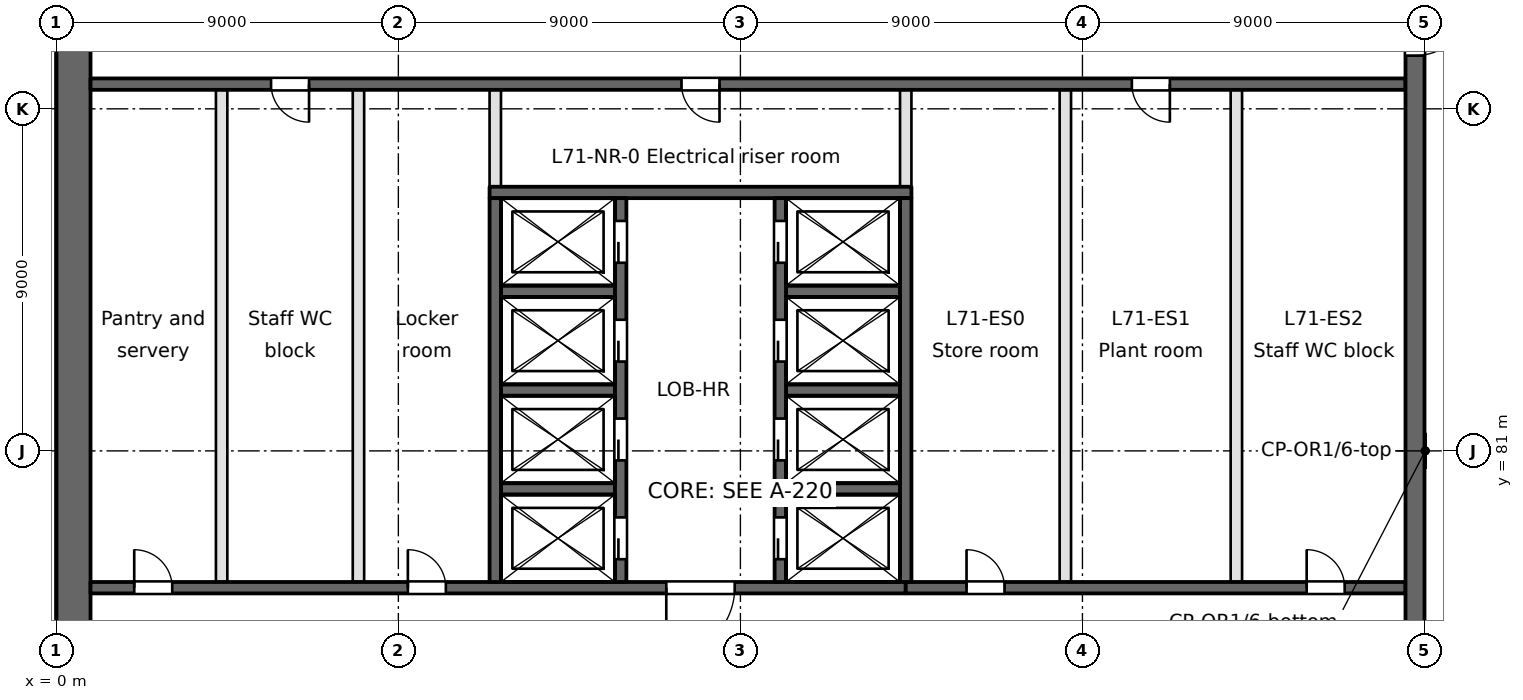
"""IFC4 building model, lengths in metres.
Left out: names, types, materials, properties, quantities, classifications, styles, units other than length and angle.
Written with IfcOpenShell. Run it as: python <this file> out.ifc"""

import sys

from ifc_helpers import new_model, si_unit, direction, frame, frame_2d, origin, place, context, subcontext, project, spatial, rectangle, extrude, element, fill, save


model = new_model("IFC4")
c1 = context("Model", 3, precision=1e-05, world=origin(), true_north=direction((0.0, 1.0)))
c2 = subcontext(c1, "Body", "Model", "MODEL_VIEW")
j1 = project(units=[si_unit("LENGTHUNIT", "METRE"), si_unit("PLANEANGLEUNIT", "RADIAN")], contexts=[c1])
p1 = place(None, origin())
s1 = spatial("IfcSite", under=j1, at=p1, CompositionType="ELEMENT")
p2 = place(p1, origin())
s2 = spatial("IfcBuilding", under=s1, at=p2, CompositionType="ELEMENT")
p3 = place(p2, frame((0.0, 0.0, 276.2)))
s3 = spatial("IfcBuildingStorey", under=s2, at=p3, CompositionType="ELEMENT", Elevation=276.2)
p4 = place(p3, frame((0.45, 94.5, 0.0), z_axis=(0.0, 0.0, 1.0), x_axis=(0.0, -1.0, 0.0)))
e1 = element("IfcWall", 1, at=p4, inside=s3, PredefinedType="SHEAR", context=c2, shape_type="SweptSolid", body=[
    extrude(rectangle(XDim=40.456, YDim=0.9, at=frame_2d((20.228, 0.0))), origin(), (0.0, 0.0, 1.0), 4.6),
])
p5 = place(p3, frame((0.9, 77.4, -0.45), z_axis=(0.0, 0.0, 1.0), x_axis=(1.0, 0.0, 0.0)))
e2 = element("IfcWall", 2, at=p5, inside=s3, PredefinedType="SOLIDWALL", context=c2, shape_type="SweptSolid", body=[
    extrude(rectangle(XDim=21.45, YDim=0.3, at=frame_2d((10.725, 0.0))), origin(), (0.0, 0.0, 1.0), 4.65),
])
p6 = place(p5, frame((15.15, 0.0, 0.45)))
e3 = element("IfcOpeningElement", 3, at=p6, cuts=e2, PredefinedType="OPENING", context=c2, shape_type="SweptSolid", body=[
    extrude(rectangle(XDim=1.8, YDim=2.1, at=frame_2d((0.9, 1.05))), frame((0.0, 0.15, 0.0), z_axis=(0.0, -1.0, 0.0), x_axis=(1.0, 0.0, 0.0)), (0.0, 0.0, 1.0), 0.3),
])
p7 = place(p5, frame((1.15, 0.0, 0.45)))
e4 = element("IfcOpeningElement", 4, at=p7, cuts=e2, PredefinedType="OPENING", context=c2, shape_type="SweptSolid", body=[
    extrude(rectangle(XDim=1.0, YDim=2.1, at=frame_2d((0.5, 1.05))), frame((0.0, 0.15, 0.0), z_axis=(0.0, -1.0, 0.0), x_axis=(1.0, 0.0, 0.0)), (0.0, 0.0, 1.0), 0.3),
])
p8 = place(p5, frame((8.35, 0.0, 0.45)))
e5 = element("IfcOpeningElement", 5, at=p8, cuts=e2, PredefinedType="OPENING", context=c2, shape_type="SweptSolid", body=[
    extrude(rectangle(XDim=1.0, YDim=2.1, at=frame_2d((0.5, 1.05))), frame((0.0, 0.15, 0.0), z_axis=(0.0, -1.0, 0.0), x_axis=(1.0, 0.0, 0.0)), (0.0, 0.0, 1.0), 0.3),
])
p9 = place(p3, frame((22.35, 77.4, 0.0), z_axis=(0.0, 0.0, 1.0), x_axis=(1.0, 0.0, 0.0)))
e6 = element("IfcWall", 6, at=p9, inside=s3, PredefinedType="SOLIDWALL", context=c2, shape_type="SweptSolid", body=[
    extrude(rectangle(XDim=13.15, YDim=0.3, at=frame_2d((6.575, 0.0))), origin(), (0.0, 0.0, 1.0), 4.2),
])
p10 = place(p9, frame((1.6, 0.0, 0.0)))
e7 = element("IfcOpeningElement", 7, at=p10, cuts=e6, PredefinedType="OPENING", context=c2, shape_type="SweptSolid", body=[
    extrude(rectangle(XDim=1.0, YDim=2.1, at=frame_2d((0.5, 1.05))), frame((0.0, 0.15, 0.0), z_axis=(0.0, -1.0, 0.0), x_axis=(1.0, 0.0, 0.0)), (0.0, 0.0, 1.0), 0.3),
])
p11 = place(p9, frame((10.55, 0.0, 0.0)))
e8 = element("IfcOpeningElement", 8, at=p11, cuts=e6, PredefinedType="OPENING", context=c2, shape_type="SweptSolid", body=[
    extrude(rectangle(XDim=1.0, YDim=2.1, at=frame_2d((0.5, 1.05))), frame((0.0, 0.15, 0.0), z_axis=(0.0, -1.0, 0.0), x_axis=(1.0, 0.0, 0.0)), (0.0, 0.0, 1.0), 0.3),
])
for number, where, z_axis, x_axis in (
    (9, (11.7, 80.0, -0.45), (0.0, 0.0, 1.0), (1.0, 0.0, 0.0)),
    (10, (19.2, 80.0, -0.45), (0.0, 0.0, 1.0), (1.0, 0.0, 0.0)),
    (11, (11.7, 82.6, -0.45), (0.0, 0.0, 1.0), (1.0, 0.0, 0.0)),
    (12, (19.2, 82.6, -0.45), (0.0, 0.0, 1.0), (1.0, 0.0, 0.0)),
    (13, (11.7, 85.2, -0.45), (0.0, 0.0, 1.0), (1.0, 0.0, 0.0)),
    (14, (19.2, 85.2, -0.45), (0.0, 0.0, 1.0), (1.0, 0.0, 0.0)),
):
    element("IfcWall", number, at=place(p3, frame(where, z_axis=z_axis, x_axis=x_axis)), inside=s3, PredefinedType="SOLIDWALL", context=c2, shape_type="SweptSolid", body=[
        extrude(rectangle(XDim=3.0, YDim=0.3, at=frame_2d((1.5, 0.0))), origin(), (0.0, 0.0, 1.0), 4.65),
    ])
p12 = place(p3, frame((11.4, 87.8, -0.45), z_axis=(0.0, 0.0, 1.0), x_axis=(1.0, 0.0, 0.0)))
e15 = element("IfcWall", 15, at=p12, inside=s3, PredefinedType="SOLIDWALL", context=c2, shape_type="SweptSolid", body=[
    extrude(rectangle(XDim=11.1, YDim=0.3, at=frame_2d((5.55, 0.0))), origin(), (0.0, 0.0, 1.0), 4.65),
])
p13 = place(p3, frame((0.9, 90.65, -0.45), z_axis=(0.0, 0.0, 1.0), x_axis=(1.0, 0.0, 0.0)))
e16 = element("IfcWall", 16, at=p13, inside=s3, PredefinedType="SOLIDWALL", context=c2, shape_type="SweptSolid", body=[
    extrude(rectangle(XDim=34.6, YDim=0.3, at=frame_2d((17.3, 0.0))), origin(), (0.0, 0.0, 1.0), 4.65),
])
p14 = place(p13, frame((15.55, 0.0, 0.45)))
e17 = element("IfcOpeningElement", 17, at=p14, cuts=e16, PredefinedType="OPENING", context=c2, shape_type="SweptSolid", body=[
    extrude(rectangle(XDim=1.0, YDim=2.1, at=frame_2d((0.5, 1.05))), frame((0.0, 0.15, 0.0), z_axis=(0.0, -1.0, 0.0), x_axis=(1.0, 0.0, 0.0)), (0.0, 0.0, 1.0), 0.3),
])
p15 = place(p13, frame((4.75, 0.0, 0.45)))
e18 = element("IfcOpeningElement", 18, at=p15, cuts=e16, PredefinedType="OPENING", context=c2, shape_type="SweptSolid", body=[
    extrude(rectangle(XDim=1.0, YDim=2.1, at=frame_2d((0.5, 1.05))), frame((0.0, 0.15, 0.0), z_axis=(0.0, -1.0, 0.0), x_axis=(1.0, 0.0, 0.0)), (0.0, 0.0, 1.0), 0.3),
])
p16 = place(p13, frame((27.4, 0.0, 0.45)))
e19 = element("IfcOpeningElement", 19, at=p16, cuts=e16, PredefinedType="OPENING", context=c2, shape_type="SweptSolid", body=[
    extrude(rectangle(XDim=1.0, YDim=2.1, at=frame_2d((0.5, 1.05))), frame((0.0, 0.15, 0.0), z_axis=(0.0, -1.0, 0.0), x_axis=(1.0, 0.0, 0.0)), (0.0, 0.0, 1.0), 0.3),
])
for number, where, z_axis, x_axis in (
    (20, (4.35, 77.55, 0.0), (0.0, 0.0, 1.0), (0.0, 1.0, 0.0)),
    (21, (7.95, 77.55, 0.0), (0.0, 0.0, 1.0), (0.0, 1.0, 0.0)),
):
    element("IfcWall", number, at=place(p3, frame(where, z_axis=z_axis, x_axis=x_axis)), inside=s3, PredefinedType="PARTITIONING", context=c2, shape_type="SweptSolid", body=[
        extrude(rectangle(XDim=12.95, YDim=0.3, at=frame_2d((6.475, 0.0))), origin(), (0.0, 0.0, 1.0), 4.2),
    ])
p17 = place(p3, frame((11.55, 77.55, -0.45), z_axis=(0.0, 0.0, 1.0), x_axis=(0.0, 1.0, 0.0)))
e22 = element("IfcWall", 22, at=p17, inside=s3, PredefinedType="SOLIDWALL", context=c2, shape_type="SweptSolid", body=[
    extrude(rectangle(XDim=10.1, YDim=0.3, at=frame_2d((5.05, 0.0))), origin(), (0.0, 0.0, 1.0), 4.65),
])
p18 = place(p3, frame((11.55, 87.95, 0.0), z_axis=(0.0, 0.0, 1.0), x_axis=(0.0, 1.0, 0.0)))
e23 = element("IfcWall", 23, at=p18, inside=s3, PredefinedType="PARTITIONING", context=c2, shape_type="SweptSolid", body=[
    extrude(rectangle(XDim=2.55, YDim=0.3, at=frame_2d((1.275, 0.0))), origin(), (0.0, 0.0, 1.0), 4.2),
])
p19 = place(p3, frame((14.85, 77.55, -0.45), z_axis=(0.0, 0.0, 1.0), x_axis=(0.0, 1.0, 0.0)))
e24 = element("IfcWall", 24, at=p19, inside=s3, PredefinedType="SOLIDWALL", context=c2, shape_type="SweptSolid", body=[
    extrude(rectangle(XDim=10.1, YDim=0.3, at=frame_2d((5.05, 0.0))), origin(), (0.0, 0.0, 1.0), 4.65),
])
p20 = place(p19, frame((0.6, 0.0, 0.45)))
e25 = element("IfcOpeningElement", 25, at=p20, cuts=e24, PredefinedType="OPENING", context=c2, shape_type="SweptSolid", body=[
    extrude(rectangle(XDim=1.1, YDim=2.1, at=frame_2d((0.55, 1.05))), frame((0.0, 0.15, 0.0), z_axis=(0.0, -1.0, 0.0), x_axis=(1.0, 0.0, 0.0)), (0.0, 0.0, 1.0), 0.3),
])
p21 = place(p19, frame((3.2, 0.0, 0.45)))
e26 = element("IfcOpeningElement", 26, at=p21, cuts=e24, PredefinedType="OPENING", context=c2, shape_type="SweptSolid", body=[
    extrude(rectangle(XDim=1.1, YDim=2.1, at=frame_2d((0.55, 1.05))), frame((0.0, 0.15, 0.0), z_axis=(0.0, -1.0, 0.0), x_axis=(1.0, 0.0, 0.0)), (0.0, 0.0, 1.0), 0.3),
])
p22 = place(p19, frame((5.8, 0.0, 0.45)))
e27 = element("IfcOpeningElement", 27, at=p22, cuts=e24, PredefinedType="OPENING", context=c2, shape_type="SweptSolid", body=[
    extrude(rectangle(XDim=1.1, YDim=2.1, at=frame_2d((0.55, 1.05))), frame((0.0, 0.15, 0.0), z_axis=(0.0, -1.0, 0.0), x_axis=(1.0, 0.0, 0.0)), (0.0, 0.0, 1.0), 0.3),
])
p23 = place(p19, frame((8.4, 0.0, 0.45)))
e28 = element("IfcOpeningElement", 28, at=p23, cuts=e24, PredefinedType="OPENING", context=c2, shape_type="SweptSolid", body=[
    extrude(rectangle(XDim=1.1, YDim=2.1, at=frame_2d((0.55, 1.05))), frame((0.0, 0.15, 0.0), z_axis=(0.0, -1.0, 0.0), x_axis=(1.0, 0.0, 0.0)), (0.0, 0.0, 1.0), 0.3),
])
p24 = place(p3, frame((19.05, 77.55, -0.45), z_axis=(0.0, 0.0, 1.0), x_axis=(0.0, 1.0, 0.0)))
e29 = element("IfcWall", 29, at=p24, inside=s3, PredefinedType="SOLIDWALL", context=c2, shape_type="SweptSolid", body=[
    extrude(rectangle(XDim=10.1, YDim=0.3, at=frame_2d((5.05, 0.0))), origin(), (0.0, 0.0, 1.0), 4.65),
])
p25 = place(p24, frame((0.6, 0.0, 0.45)))
e30 = element("IfcOpeningElement", 30, at=p25, cuts=e29, PredefinedType="OPENING", context=c2, shape_type="SweptSolid", body=[
    extrude(rectangle(XDim=1.1, YDim=2.1, at=frame_2d((0.55, 1.05))), frame((0.0, 0.15, 0.0), z_axis=(0.0, -1.0, 0.0), x_axis=(1.0, 0.0, 0.0)), (0.0, 0.0, 1.0), 0.3),
])
p26 = place(p24, frame((3.2, 0.0, 0.45)))
e31 = element("IfcOpeningElement", 31, at=p26, cuts=e29, PredefinedType="OPENING", context=c2, shape_type="SweptSolid", body=[
    extrude(rectangle(XDim=1.1, YDim=2.1, at=frame_2d((0.55, 1.05))), frame((0.0, 0.15, 0.0), z_axis=(0.0, -1.0, 0.0), x_axis=(1.0, 0.0, 0.0)), (0.0, 0.0, 1.0), 0.3),
])
p27 = place(p24, frame((5.8, 0.0, 0.45)))
e32 = element("IfcOpeningElement", 32, at=p27, cuts=e29, PredefinedType="OPENING", context=c2, shape_type="SweptSolid", body=[
    extrude(rectangle(XDim=1.1, YDim=2.1, at=frame_2d((0.55, 1.05))), frame((0.0, 0.15, 0.0), z_axis=(0.0, -1.0, 0.0), x_axis=(1.0, 0.0, 0.0)), (0.0, 0.0, 1.0), 0.3),
])
p28 = place(p24, frame((8.4, 0.0, 0.45)))
e33 = element("IfcOpeningElement", 33, at=p28, cuts=e29, PredefinedType="OPENING", context=c2, shape_type="SweptSolid", body=[
    extrude(rectangle(XDim=1.1, YDim=2.1, at=frame_2d((0.55, 1.05))), frame((0.0, 0.15, 0.0), z_axis=(0.0, -1.0, 0.0), x_axis=(1.0, 0.0, 0.0)), (0.0, 0.0, 1.0), 0.3),
])
p29 = place(p3, frame((22.35, 77.55, -0.45), z_axis=(0.0, 0.0, 1.0), x_axis=(0.0, 1.0, 0.0)))
e34 = element("IfcWall", 34, at=p29, inside=s3, PredefinedType="SOLIDWALL", context=c2, shape_type="SweptSolid", body=[
    extrude(rectangle(XDim=10.1, YDim=0.3, at=frame_2d((5.05, 0.0))), origin(), (0.0, 0.0, 1.0), 4.65),
])
p30 = place(p3, frame((22.35, 87.95, 0.0), z_axis=(0.0, 0.0, 1.0), x_axis=(0.0, 1.0, 0.0)))
e35 = element("IfcWall", 35, at=p30, inside=s3, PredefinedType="PARTITIONING", context=c2, shape_type="SweptSolid", body=[
    extrude(rectangle(XDim=2.55, YDim=0.3, at=frame_2d((1.275, 0.0))), origin(), (0.0, 0.0, 1.0), 4.2),
])
for number, where, z_axis, x_axis in (
    (36, (26.55, 77.55, 0.0), (0.0, 0.0, 1.0), (0.0, 1.0, 0.0)),
    (37, (31.05, 77.55, 0.0), (0.0, 0.0, 1.0), (0.0, 1.0, 0.0)),
):
    element("IfcWall", number, at=place(p3, frame(where, z_axis=z_axis, x_axis=x_axis)), inside=s3, PredefinedType="PARTITIONING", context=c2, shape_type="SweptSolid", body=[
        extrude(rectangle(XDim=12.95, YDim=0.3, at=frame_2d((6.475, 0.0))), origin(), (0.0, 0.0, 1.0), 4.2),
    ])
p31 = place(p3, frame((35.75, 63.5, -0.45), z_axis=(0.0, 0.0, 1.0), x_axis=(0.0, 1.0, 0.0)))
e38 = element("IfcWall", 38, at=p31, inside=s3, PredefinedType="SOLIDWALL", context=c2, shape_type="SweptSolid", body=[
    extrude(rectangle(XDim=34.6, YDim=0.5, at=frame_2d((17.3, 0.0))), origin(), (0.0, 0.0, 1.0), 4.65),
])
p32 = place(p31, frame((9.7, 0.0, 0.45)))
e39 = element("IfcOpeningElement", 39, at=p32, cuts=e38, PredefinedType="OPENING", context=c2, shape_type="SweptSolid", body=[
    extrude(rectangle(XDim=2.4, YDim=2.1, at=frame_2d((1.2, 1.05))), frame((0.0, 0.25, 0.0), z_axis=(0.0, -1.0, 0.0), x_axis=(1.0, 0.0, 0.0)), (0.0, 0.0, 1.0), 0.5),
])
p33 = place(p31, frame((27.9, 0.0, 0.45)))
e40 = element("IfcOpeningElement", 40, at=p33, cuts=e38, PredefinedType="OPENING", context=c2, shape_type="SweptSolid", body=[
    extrude(rectangle(XDim=1.5, YDim=2.1, at=frame_2d((0.75, 1.05))), frame((0.0, 0.25, 0.0), z_axis=(0.0, -1.0, 0.0), x_axis=(1.0, 0.0, 0.0)), (0.0, 0.0, 1.0), 0.5),
])
p34 = place(p31, frame((1.5, 0.0, 0.45)))
e41 = element("IfcOpeningElement", 41, at=p34, cuts=e38, PredefinedType="OPENING", context=c2, shape_type="SweptSolid", body=[
    extrude(rectangle(XDim=1.2, YDim=2.1, at=frame_2d((0.6, 1.05))), frame((0.0, 0.25, 0.0), z_axis=(0.0, -1.0, 0.0), x_axis=(1.0, 0.0, 0.0)), (0.0, 0.0, 1.0), 0.5),
])
p35 = place(p20, origin())
e42 = element("IfcDoor", 42, at=p35, inside=s3, OperationType="SLIDING_TO_RIGHT", PredefinedType="DOOR", context=c2, shape_type="SweptSolid", body=[
    extrude(rectangle(XDim=1.1, YDim=2.1, at=frame_2d((0.55, 1.05))), frame((0.0, 0.025, 0.0), z_axis=(0.0, -1.0, 0.0), x_axis=(1.0, 0.0, 0.0)), (0.0, 0.0, 1.0), 0.05),
])
fill(e25, e42)
p36 = place(p21, origin())
e43 = element("IfcDoor", 43, at=p36, inside=s3, OperationType="SLIDING_TO_LEFT", PredefinedType="DOOR", context=c2, shape_type="SweptSolid", body=[
    extrude(rectangle(XDim=1.1, YDim=2.1, at=frame_2d((0.55, 1.05))), frame((0.0, 0.025, 0.0), z_axis=(0.0, -1.0, 0.0), x_axis=(1.0, 0.0, 0.0)), (0.0, 0.0, 1.0), 0.05),
])
fill(e26, e43)
p37 = place(p22, origin())
e44 = element("IfcDoor", 44, at=p37, inside=s3, OperationType="SLIDING_TO_RIGHT", PredefinedType="DOOR", context=c2, shape_type="SweptSolid", body=[
    extrude(rectangle(XDim=1.1, YDim=2.1, at=frame_2d((0.55, 1.05))), frame((0.0, 0.025, 0.0), z_axis=(0.0, -1.0, 0.0), x_axis=(1.0, 0.0, 0.0)), (0.0, 0.0, 1.0), 0.05),
])
fill(e27, e44)
p38 = place(p23, origin())
e45 = element("IfcDoor", 45, at=p38, inside=s3, OperationType="SLIDING_TO_LEFT", PredefinedType="DOOR", context=c2, shape_type="SweptSolid", body=[
    extrude(rectangle(XDim=1.1, YDim=2.1, at=frame_2d((0.55, 1.05))), frame((0.0, 0.025, 0.0), z_axis=(0.0, -1.0, 0.0), x_axis=(1.0, 0.0, 0.0)), (0.0, 0.0, 1.0), 0.05),
])
fill(e28, e45)
p39 = place(p25, origin())
e46 = element("IfcDoor", 46, at=p39, inside=s3, OperationType="SLIDING_TO_RIGHT", PredefinedType="DOOR", context=c2, shape_type="SweptSolid", body=[
    extrude(rectangle(XDim=1.1, YDim=2.1, at=frame_2d((0.55, 1.05))), frame((0.0, 0.025, 0.0), z_axis=(0.0, -1.0, 0.0), x_axis=(1.0, 0.0, 0.0)), (0.0, 0.0, 1.0), 0.05),
])
fill(e30, e46)
p40 = place(p26, origin())
e47 = element("IfcDoor", 47, at=p40, inside=s3, OperationType="SLIDING_TO_LEFT", PredefinedType="DOOR", context=c2, shape_type="SweptSolid", body=[
    extrude(rectangle(XDim=1.1, YDim=2.1, at=frame_2d((0.55, 1.05))), frame((0.0, 0.025, 0.0), z_axis=(0.0, -1.0, 0.0), x_axis=(1.0, 0.0, 0.0)), (0.0, 0.0, 1.0), 0.05),
])
fill(e31, e47)
p41 = place(p27, origin())
e48 = element("IfcDoor", 48, at=p41, inside=s3, OperationType="SLIDING_TO_RIGHT", PredefinedType="DOOR", context=c2, shape_type="SweptSolid", body=[
    extrude(rectangle(XDim=1.1, YDim=2.1, at=frame_2d((0.55, 1.05))), frame((0.0, 0.025, 0.0), z_axis=(0.0, -1.0, 0.0), x_axis=(1.0, 0.0, 0.0)), (0.0, 0.0, 1.0), 0.05),
])
fill(e32, e48)
p42 = place(p28, origin())
e49 = element("IfcDoor", 49, at=p42, inside=s3, OperationType="SLIDING_TO_LEFT", PredefinedType="DOOR", context=c2, shape_type="SweptSolid", body=[
    extrude(rectangle(XDim=1.1, YDim=2.1, at=frame_2d((0.55, 1.05))), frame((0.0, 0.025, 0.0), z_axis=(0.0, -1.0, 0.0), x_axis=(1.0, 0.0, 0.0)), (0.0, 0.0, 1.0), 0.05),
])
fill(e33, e49)
p43 = place(p6, frame((1.8, 0.0, 0.0), z_axis=(0.0, 0.0, 1.0), x_axis=(-1.0, 0.0, 0.0)))
e50 = element("IfcDoor", 50, at=p43, inside=s3, OperationType="SINGLE_SWING_RIGHT", PredefinedType="DOOR", context=c2, shape_type="SweptSolid", body=[
    extrude(rectangle(XDim=1.8, YDim=2.1, at=frame_2d((0.9, 1.05))), frame((0.0, 0.025, 0.0), z_axis=(0.0, -1.0, 0.0), x_axis=(1.0, 0.0, 0.0)), (0.0, 0.0, 1.0), 0.05),
])
fill(e3, e50)
p44 = place(p33, frame((1.5, 0.0, 0.0), z_axis=(0.0, 0.0, 1.0), x_axis=(-1.0, 0.0, 0.0)))
e51 = element("IfcDoor", 51, at=p44, inside=s3, OperationType="SINGLE_SWING_LEFT", PredefinedType="DOOR", context=c2, shape_type="SweptSolid", body=[
    extrude(rectangle(XDim=1.5, YDim=2.1, at=frame_2d((0.75, 1.05))), frame((0.0, 0.025, 0.0), z_axis=(0.0, -1.0, 0.0), x_axis=(1.0, 0.0, 0.0)), (0.0, 0.0, 1.0), 0.05),
])
fill(e40, e51)
p45 = place(p14, frame((1.0, 0.0, 0.0), z_axis=(0.0, 0.0, 1.0), x_axis=(-1.0, 0.0, 0.0)))
e52 = element("IfcDoor", 52, at=p45, inside=s3, OperationType="SINGLE_SWING_LEFT", PredefinedType="DOOR", context=c2, shape_type="SweptSolid", body=[
    extrude(rectangle(XDim=1.0, YDim=2.1, at=frame_2d((0.5, 1.05))), frame((0.0, 0.025, 0.0), z_axis=(0.0, -1.0, 0.0), x_axis=(1.0, 0.0, 0.0)), (0.0, 0.0, 1.0), 0.05),
])
fill(e17, e52)
p46 = place(p7, origin())
e53 = element("IfcDoor", 53, at=p46, inside=s3, OperationType="SINGLE_SWING_LEFT", PredefinedType="DOOR", context=c2, shape_type="SweptSolid", body=[
    extrude(rectangle(XDim=1.0, YDim=2.1, at=frame_2d((0.5, 1.05))), frame((0.0, 0.025, 0.0), z_axis=(0.0, -1.0, 0.0), x_axis=(1.0, 0.0, 0.0)), (0.0, 0.0, 1.0), 0.05),
])
fill(e4, e53)
p47 = place(p15, frame((1.0, 0.0, 0.0), z_axis=(0.0, 0.0, 1.0), x_axis=(-1.0, 0.0, 0.0)))
e54 = element("IfcDoor", 54, at=p47, inside=s3, OperationType="SINGLE_SWING_LEFT", PredefinedType="DOOR", context=c2, shape_type="SweptSolid", body=[
    extrude(rectangle(XDim=1.0, YDim=2.1, at=frame_2d((0.5, 1.05))), frame((0.0, 0.025, 0.0), z_axis=(0.0, -1.0, 0.0), x_axis=(1.0, 0.0, 0.0)), (0.0, 0.0, 1.0), 0.05),
])
fill(e18, e54)
p48 = place(p8, origin())
e55 = element("IfcDoor", 55, at=p48, inside=s3, OperationType="SINGLE_SWING_LEFT", PredefinedType="DOOR", context=c2, shape_type="SweptSolid", body=[
    extrude(rectangle(XDim=1.0, YDim=2.1, at=frame_2d((0.5, 1.05))), frame((0.0, 0.025, 0.0), z_axis=(0.0, -1.0, 0.0), x_axis=(1.0, 0.0, 0.0)), (0.0, 0.0, 1.0), 0.05),
])
fill(e5, e55)
p49 = place(p10, origin())
e56 = element("IfcDoor", 56, at=p49, inside=s3, OperationType="SINGLE_SWING_LEFT", PredefinedType="DOOR", context=c2, shape_type="SweptSolid", body=[
    extrude(rectangle(XDim=1.0, YDim=2.1, at=frame_2d((0.5, 1.05))), frame((0.0, 0.025, 0.0), z_axis=(0.0, -1.0, 0.0), x_axis=(1.0, 0.0, 0.0)), (0.0, 0.0, 1.0), 0.05),
])
fill(e7, e56)
p50 = place(p16, frame((1.0, 0.0, 0.0), z_axis=(0.0, 0.0, 1.0), x_axis=(-1.0, 0.0, 0.0)))
e57 = element("IfcDoor", 57, at=p50, inside=s3, OperationType="SINGLE_SWING_LEFT", PredefinedType="DOOR", context=c2, shape_type="SweptSolid", body=[
    extrude(rectangle(XDim=1.0, YDim=2.1, at=frame_2d((0.5, 1.05))), frame((0.0, 0.025, 0.0), z_axis=(0.0, -1.0, 0.0), x_axis=(1.0, 0.0, 0.0)), (0.0, 0.0, 1.0), 0.05),
])
fill(e19, e57)
p51 = place(p11, origin())
e58 = element("IfcDoor", 58, at=p51, inside=s3, OperationType="SINGLE_SWING_LEFT", PredefinedType="DOOR", context=c2, shape_type="SweptSolid", body=[
    extrude(rectangle(XDim=1.0, YDim=2.1, at=frame_2d((0.5, 1.05))), frame((0.0, 0.025, 0.0), z_axis=(0.0, -1.0, 0.0), x_axis=(1.0, 0.0, 0.0)), (0.0, 0.0, 1.0), 0.05),
])
fill(e8, e58)
save(model, sys.argv[1])
